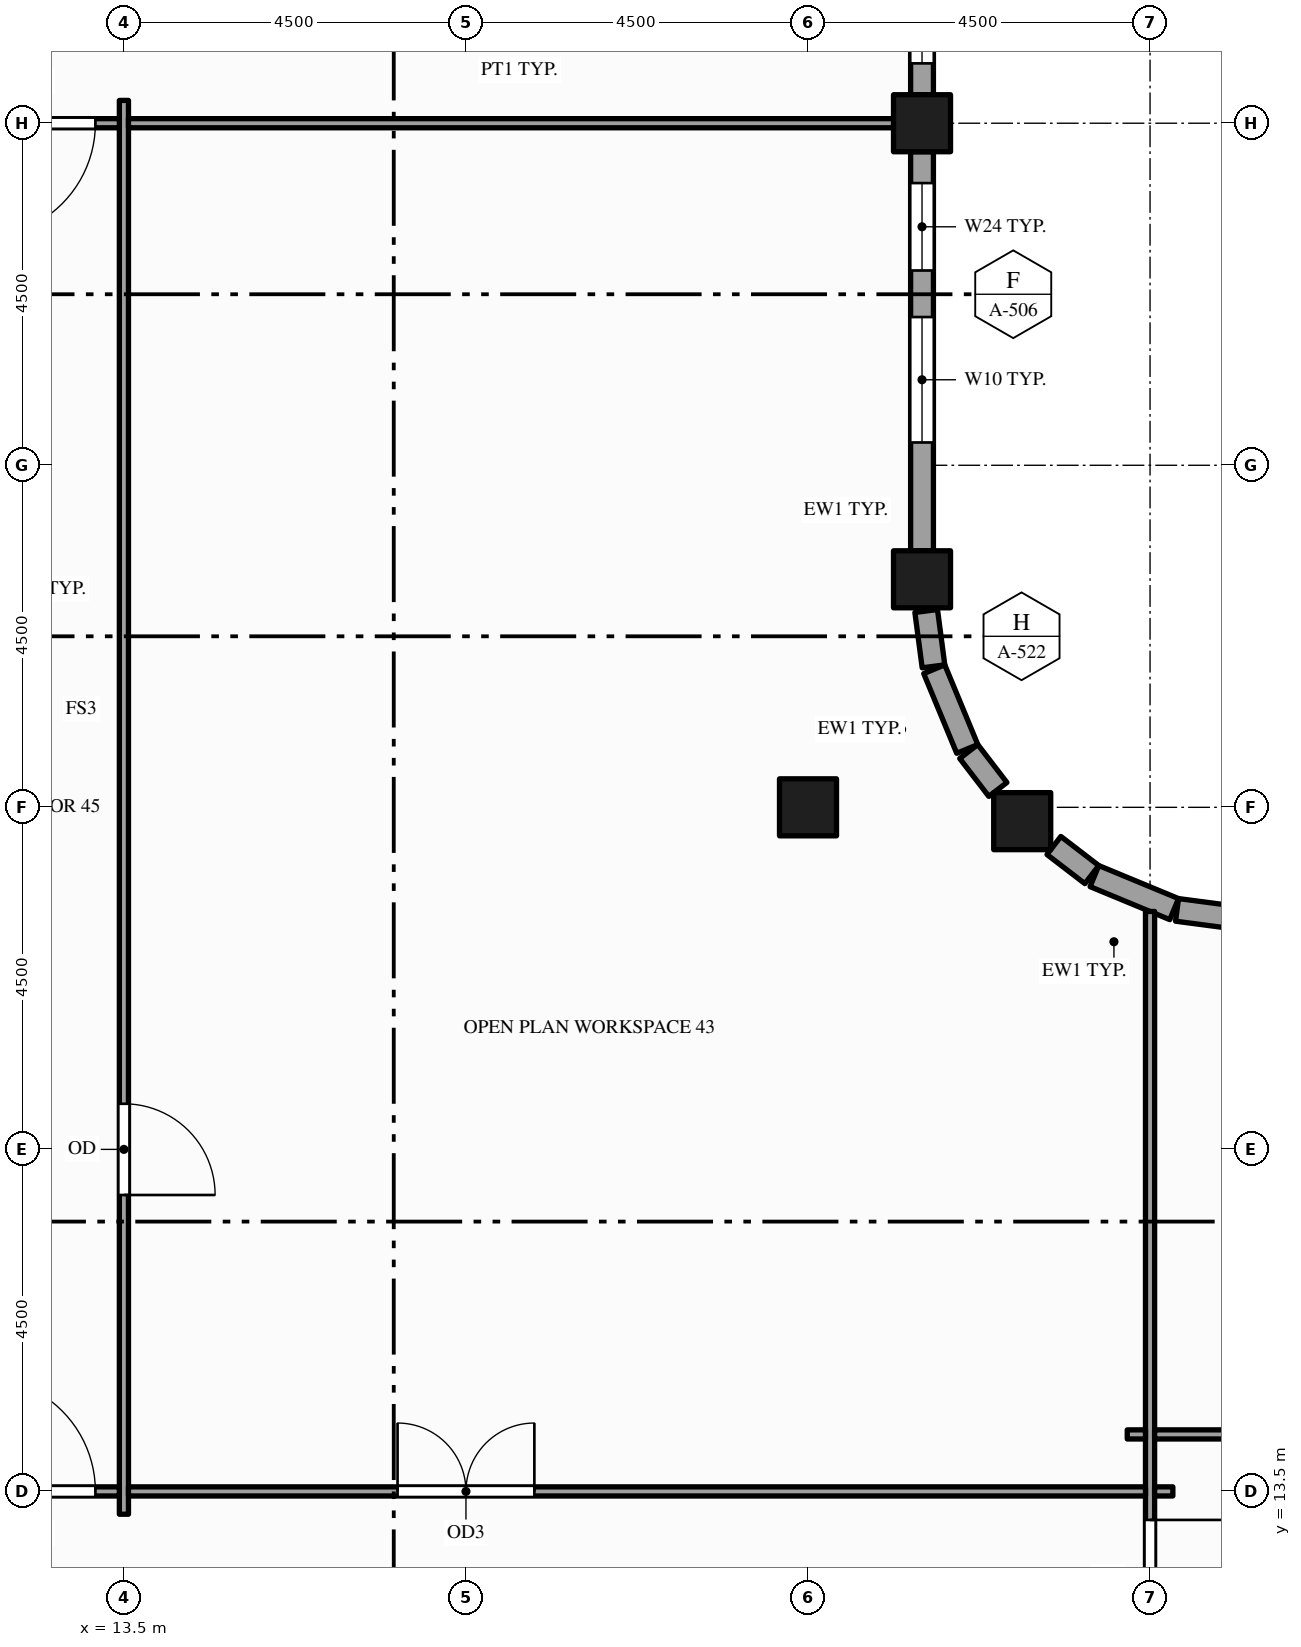
"""IFC4 building model, lengths in metres.
Left out: names, types, materials, properties, quantities, classifications, styles, units other than length and angle.
Written with IfcOpenShell. Run it as: python <this file> out.ifc"""

import sys

from ifc_helpers import new_model, si_unit, direction, frame, frame_2d, origin, origin_2d, place, context, subcontext, project, spatial, rectangle, hollow_rectangle, extrude, element, fill, save


model = new_model("IFC4")
c1 = context("Model", 3, precision=1e-05, world=origin(), true_north=direction((0.0, 1.0)))
c2 = subcontext(c1, "Body", "Model", "MODEL_VIEW")
j1 = project(units=[si_unit("LENGTHUNIT", "METRE"), si_unit("PLANEANGLEUNIT", "RADIAN")], contexts=[c1])
p1 = place(None, origin())
s1 = spatial("IfcSite", under=j1, at=p1, CompositionType="ELEMENT")
p2 = place(p1, origin())
s2 = spatial("IfcBuilding", under=s1, at=p2, CompositionType="ELEMENT")
p3 = place(p2, frame((0.0, 0.0, 207.0)))
s3 = spatial("IfcBuildingStorey", under=s2, at=p3, CompositionType="ELEMENT", Elevation=207.0)
for number, where, z_axis, x_axis in (
    (1, (22.5, 22.5, -0.15), (0.0, 0.0, 1.0), (1.0, 0.0, 0.0)),
    (2, (24.0, 25.5, -0.15), (0.0, 0.0, 1.0), (1.0, 0.0, 0.0)),
    (3, (24.0, 31.5, -0.15), (0.0, 0.0, 1.0), (1.0, 0.0, 0.0)),
    (4, (25.318, 22.318, -0.15), (0.0, 0.0, 1.0), (1.0, 0.0, 0.0)),
):
    element("IfcColumn", number, at=place(p3, frame(where, z_axis=z_axis, x_axis=x_axis)), inside=s3, PredefinedType="COLUMN", context=c2, shape_type="SweptSolid", body=[
        extrude(hollow_rectangle(XDim=0.75, YDim=0.75, WallThickness=0.036, at=origin_2d()), origin(), (0.0, 0.0, 1.0), 4.0),
    ])
p4 = place(p3, frame((28.083, 21.055, 0.0), z_axis=(0.0, 0.0, 1.0), x_axis=(-0.99142711513, 0.130660917588, 0.0)))
e5 = element("IfcWall", 5, at=p4, inside=s3, PredefinedType="STANDARD", context=c2, shape_type="SweptSolid", body=[
    extrude(rectangle(XDim=0.734, YDim=0.3, at=frame_2d((0.367, 0.0))), origin(), (0.0, 0.0, 1.0), 3.157),
])
p5 = place(p3, frame((27.317, 21.161, 0.0), z_axis=(0.0, 0.0, 1.0), x_axis=(-0.923914616768, 0.382598720491, 0.0)))
e6 = element("IfcWall", 6, at=p5, inside=s3, PredefinedType="STANDARD", context=c2, shape_type="SweptSolid", body=[
    extrude(rectangle(XDim=1.135, YDim=0.3, at=frame_2d((0.568, 0.0))), origin(), (0.0, 0.0, 1.0), 2.87),
])
p6 = place(p3, frame((26.234, 21.615, 0.0), z_axis=(0.0, 0.0, 1.0), x_axis=(-0.793575131083, 0.608472276547, 0.0)))
e7 = element("IfcWall", 7, at=p6, inside=s3, PredefinedType="STANDARD", context=c2, shape_type="SweptSolid", body=[
    extrude(rectangle(XDim=0.629, YDim=0.3, at=frame_2d((0.314, 0.0))), origin(), (0.0, 0.0, 1.0), 3.157),
])
p7 = place(p3, frame((24.998, 22.735, 0.0), z_axis=(0.0, 0.0, 1.0), x_axis=(-0.608472276547, 0.793575131083, 0.0)))
e8 = element("IfcWall", 8, at=p7, inside=s3, PredefinedType="STANDARD", context=c2, shape_type="SweptSolid", body=[
    extrude(rectangle(XDim=0.629, YDim=0.3, at=frame_2d((0.314, 0.0))), origin(), (0.0, 0.0, 1.0), 2.76),
])
p8 = place(p3, frame((24.595, 23.268, 0.0), z_axis=(0.0, 0.0, 1.0), x_axis=(-0.382598720491, 0.923914616768, 0.0)))
e9 = element("IfcWall", 9, at=p8, inside=s3, PredefinedType="STANDARD", context=c2, shape_type="SweptSolid", body=[
    extrude(rectangle(XDim=1.135, YDim=0.3, at=frame_2d((0.568, 0.0))), origin(), (0.0, 0.0, 1.0), 2.76),
])
p9 = place(p3, frame((24.151, 24.355, 0.0), z_axis=(0.0, 0.0, 1.0), x_axis=(-0.130660917588, 0.99142711513, 0.0)))
e10 = element("IfcWall", 10, at=p9, inside=s3, PredefinedType="STANDARD", context=c2, shape_type="SweptSolid", body=[
    extrude(rectangle(XDim=0.734, YDim=0.3, at=frame_2d((0.367, 0.0))), origin(), (0.0, 0.0, 1.0), 3.157),
])
p10 = place(p3, frame((24.0, 25.875, 0.0), z_axis=(0.0, 0.0, 1.0), x_axis=(0.0, 1.0, 0.0)))
e11 = element("IfcWall", 11, at=p10, inside=s3, PredefinedType="STANDARD", context=c2, shape_type="SweptSolid", body=[
    extrude(rectangle(XDim=5.25, YDim=0.3, at=frame_2d((2.625, 0.0))), origin(), (0.0, 0.0, 1.0), 3.157),
])
p11 = place(p10, frame((1.425, 0.0, 0.9)))
e12 = element("IfcOpeningElement", 12, at=p11, cuts=e11, PredefinedType="OPENING", context=c2, shape_type="SweptSolid", body=[
    extrude(rectangle(XDim=1.65, YDim=2.0, at=frame_2d((0.825, 1.0))), frame((0.0, 0.16, 0.0), z_axis=(0.0, -1.0, 0.0), x_axis=(1.0, 0.0, 0.0)), (0.0, 0.0, 1.0), 0.32),
])
p12 = place(p10, frame((3.688, 0.0, 0.9)))
e13 = element("IfcOpeningElement", 13, at=p12, cuts=e11, PredefinedType="OPENING", context=c2, shape_type="SweptSolid", body=[
    extrude(rectangle(XDim=1.15, YDim=2.0, at=frame_2d((0.575, 1.0))), frame((0.0, 0.16, 0.0), z_axis=(0.0, -1.0, 0.0), x_axis=(1.0, 0.0, 0.0)), (0.0, 0.0, 1.0), 0.32),
])
p13 = place(p3, frame((24.0, 31.875, 0.0), z_axis=(0.0, 0.0, 1.0), x_axis=(0.0, 1.0, 0.0)))
e14 = element("IfcWall", 14, at=p13, inside=s3, PredefinedType="STANDARD", context=c2, shape_type="SweptSolid", body=[
    extrude(rectangle(XDim=3.75, YDim=0.3, at=frame_2d((1.875, 0.0))), origin(), (0.0, 0.0, 1.0), 3.157),
])
p14 = place(p13, frame((0.413, 0.0, 0.9)))
e15 = element("IfcOpeningElement", 15, at=p14, cuts=e14, PredefinedType="OPENING", context=c2, shape_type="SweptSolid", body=[
    extrude(rectangle(XDim=1.15, YDim=2.0, at=frame_2d((0.575, 1.0))), frame((0.0, 0.16, 0.0), z_axis=(0.0, -1.0, 0.0), x_axis=(1.0, 0.0, 0.0)), (0.0, 0.0, 1.0), 0.32),
])
p15 = place(p13, frame((2.188, 0.0, 0.9)))
e16 = element("IfcOpeningElement", 16, at=p15, cuts=e14, PredefinedType="OPENING", context=c2, shape_type="SweptSolid", body=[
    extrude(rectangle(XDim=1.15, YDim=2.0, at=frame_2d((0.575, 1.0))), frame((0.0, 0.16, 0.0), z_axis=(0.0, -1.0, 0.0), x_axis=(1.0, 0.0, 0.0)), (0.0, 0.0, 1.0), 0.32),
])
p16 = place(p3, frame((13.5, 13.2, 0.0), z_axis=(0.0, 0.0, 1.0), x_axis=(0.0, 1.0, 0.0)))
e17 = element("IfcWall", 17, at=p16, inside=s3, PredefinedType="PARTITIONING", context=c2, shape_type="SweptSolid", body=[
    extrude(rectangle(XDim=18.6, YDim=0.12, at=frame_2d((9.3, 0.0))), origin(), (0.0, 0.0, 1.0), 2.6),
])
p17 = place(p16, frame((4.2, 0.0, 0.0)))
e18 = element("IfcOpeningElement", 18, at=p17, cuts=e17, PredefinedType="OPENING", context=c2, shape_type="SweptSolid", body=[
    extrude(rectangle(XDim=1.2, YDim=2.1, at=frame_2d((0.6, 1.05))), frame((0.0, 0.07, 0.0), z_axis=(0.0, -1.0, 0.0), x_axis=(1.0, 0.0, 0.0)), (0.0, 0.0, 1.0), 0.14),
])
p18 = place(p3, frame((27.0, -1.35, 0.0), z_axis=(0.0, 0.0, 1.0), x_axis=(0.0, 1.0, 0.0)))
e19 = element("IfcWall", 19, at=p18, inside=s3, PredefinedType="PARTITIONING", context=c2, shape_type="SweptSolid", body=[
    extrude(rectangle(XDim=22.48, YDim=0.12, at=frame_2d((11.24, 0.0))), origin(), (0.0, 0.0, 1.0), 2.87),
])
p19 = place(p18, frame((12.975, 0.0, 0.0)))
e20 = element("IfcOpeningElement", 20, at=p19, cuts=e19, PredefinedType="OPENING", context=c2, shape_type="SweptSolid", body=[
    extrude(rectangle(XDim=1.5, YDim=2.1, at=frame_2d((0.75, 1.05))), frame((0.0, 0.07, 0.0), z_axis=(0.0, -1.0, 0.0), x_axis=(1.0, 0.0, 0.0)), (0.0, 0.0, 1.0), 0.14),
])
p20 = place(p3, frame((11.31, 13.5, 0.0), z_axis=(0.0, 0.0, 1.0), x_axis=(1.0, 0.0, 0.0)))
e21 = element("IfcWall", 21, at=p20, inside=s3, PredefinedType="PARTITIONING", context=c2, shape_type="SweptSolid", body=[
    extrude(rectangle(XDim=2.13, YDim=0.12, at=frame_2d((1.065, 0.0))), origin(), (0.0, 0.0, 1.0), 2.87),
])
p21 = place(p20, frame((0.315, 0.0, 0.0)))
e22 = element("IfcOpeningElement", 22, at=p21, cuts=e21, PredefinedType="OPENING", context=c2, shape_type="SweptSolid", body=[
    extrude(rectangle(XDim=1.5, YDim=2.1, at=frame_2d((0.75, 1.05))), frame((0.0, 0.07, 0.0), z_axis=(0.0, -1.0, 0.0), x_axis=(1.0, 0.0, 0.0)), (0.0, 0.0, 1.0), 0.14),
])
p22 = place(p3, frame((13.56, 13.5, 0.0), z_axis=(0.0, 0.0, 1.0), x_axis=(1.0, 0.0, 0.0)))
e23 = element("IfcWall", 23, at=p22, inside=s3, PredefinedType="PARTITIONING", context=c2, shape_type="SweptSolid", body=[
    extrude(rectangle(XDim=13.38, YDim=0.12, at=frame_2d((6.69, 0.0))), origin(), (0.0, 0.0, 1.0), 2.76),
])
p23 = place(p22, frame((3.54, 0.0, 0.0)))
e24 = element("IfcOpeningElement", 24, at=p23, cuts=e23, PredefinedType="OPENING", context=c2, shape_type="SweptSolid", body=[
    extrude(rectangle(XDim=1.8, YDim=2.1, at=frame_2d((0.9, 1.05))), frame((0.0, 0.07, 0.0), z_axis=(0.0, -1.0, 0.0), x_axis=(1.0, 0.0, 0.0)), (0.0, 0.0, 1.0), 0.14),
])
for number, where, z_axis, x_axis in (
    (25, (27.06, 13.5, 0.0), (0.0, 0.0, 1.0), (1.0, 0.0, 0.0)),
    (26, (26.7, 14.25, 0.0), (0.0, 0.0, 1.0), (1.0, 0.0, 0.0)),
):
    element("IfcWall", number, at=place(p3, frame(where, z_axis=z_axis, x_axis=x_axis)), inside=s3, PredefinedType="PARTITIONING", context=c2, shape_type="SweptSolid", body=[
        extrude(rectangle(XDim=0.24, YDim=0.12, at=frame_2d((0.12, 0.0))), origin(), (0.0, 0.0, 1.0), 2.87),
    ])
p24 = place(p3, frame((27.06, 14.25, 0.0), z_axis=(0.0, 0.0, 1.0), x_axis=(1.0, 0.0, 0.0)))
e27 = element("IfcWall", 27, at=p24, inside=s3, PredefinedType="PARTITIONING", context=c2, shape_type="SweptSolid", body=[
    extrude(rectangle(XDim=2.13, YDim=0.12, at=frame_2d((1.065, 0.0))), origin(), (0.0, 0.0, 1.0), 2.87),
])
p25 = place(p3, frame((11.31, 31.5, 0.0), z_axis=(0.0, 0.0, 1.0), x_axis=(1.0, 0.0, 0.0)))
e28 = element("IfcWall", 28, at=p25, inside=s3, PredefinedType="PARTITIONING", context=c2, shape_type="SweptSolid", body=[
    extrude(rectangle(XDim=2.13, YDim=0.12, at=frame_2d((1.065, 0.0))), origin(), (0.0, 0.0, 1.0), 2.87),
])
p26 = place(p25, frame((0.315, 0.0, 0.0)))
e29 = element("IfcOpeningElement", 29, at=p26, cuts=e28, PredefinedType="OPENING", context=c2, shape_type="SweptSolid", body=[
    extrude(rectangle(XDim=1.5, YDim=2.1, at=frame_2d((0.75, 1.05))), frame((0.0, 0.07, 0.0), z_axis=(0.0, -1.0, 0.0), x_axis=(1.0, 0.0, 0.0)), (0.0, 0.0, 1.0), 0.14),
])
p27 = place(p3, frame((13.56, 31.5, 0.0), z_axis=(0.0, 0.0, 1.0), x_axis=(1.0, 0.0, 0.0)))
e30 = element("IfcWall", 30, at=p27, inside=s3, PredefinedType="PARTITIONING", context=c2, shape_type="SweptSolid", body=[
    extrude(rectangle(XDim=10.29, YDim=0.12, at=frame_2d((5.145, 0.0))), origin(), (0.0, 0.0, 1.0), 2.87),
])
p28 = place(p11, origin())
e31 = element("IfcWindow", 31, at=p28, inside=s3, PartitioningType="SINGLE_PANEL", PredefinedType="WINDOW", context=c2, shape_type="SweptSolid", body=[
    extrude(rectangle(XDim=1.65, YDim=2.0, at=frame_2d((0.825, 1.0))), frame((0.0, 0.03, 0.0), z_axis=(0.0, -1.0, 0.0), x_axis=(1.0, 0.0, 0.0)), (0.0, 0.0, 1.0), 0.06),
])
fill(e12, e31)
p29 = place(p12, origin())
e32 = element("IfcWindow", 32, at=p29, inside=s3, PartitioningType="SINGLE_PANEL", PredefinedType="WINDOW", context=c2, shape_type="SweptSolid", body=[
    extrude(rectangle(XDim=1.15, YDim=2.0, at=frame_2d((0.575, 1.0))), frame((0.0, 0.03, 0.0), z_axis=(0.0, -1.0, 0.0), x_axis=(1.0, 0.0, 0.0)), (0.0, 0.0, 1.0), 0.06),
])
fill(e13, e32)
p30 = place(p14, origin())
e33 = element("IfcWindow", 33, at=p30, inside=s3, PartitioningType="SINGLE_PANEL", PredefinedType="WINDOW", context=c2, shape_type="SweptSolid", body=[
    extrude(rectangle(XDim=1.15, YDim=2.0, at=frame_2d((0.575, 1.0))), frame((0.0, 0.03, 0.0), z_axis=(0.0, -1.0, 0.0), x_axis=(1.0, 0.0, 0.0)), (0.0, 0.0, 1.0), 0.06),
])
fill(e15, e33)
p31 = place(p19, origin())
e34 = element("IfcDoor", 34, at=p31, inside=s3, OperationType="SINGLE_SWING_RIGHT", PredefinedType="DOOR", context=c2, shape_type="SweptSolid", body=[
    extrude(rectangle(XDim=1.5, YDim=2.1, at=frame_2d((0.75, 1.05))), frame((0.0, 0.025, 0.0), z_axis=(0.0, -1.0, 0.0), x_axis=(1.0, 0.0, 0.0)), (0.0, 0.0, 1.0), 0.05),
])
fill(e20, e34)
p32 = place(p23, origin())
e35 = element("IfcDoor", 35, at=p32, inside=s3, OperationType="DOUBLE_DOOR_SINGLE_SWING", PredefinedType="DOOR", context=c2, shape_type="SweptSolid", body=[
    extrude(rectangle(XDim=1.8, YDim=2.1, at=frame_2d((0.9, 1.05))), frame((0.0, 0.025, 0.0), z_axis=(0.0, -1.0, 0.0), x_axis=(1.0, 0.0, 0.0)), (0.0, 0.0, 1.0), 0.05),
])
fill(e24, e35)
p33 = place(p21, origin())
e36 = element("IfcDoor", 36, at=p33, inside=s3, OperationType="SINGLE_SWING_LEFT", PredefinedType="DOOR", context=c2, shape_type="SweptSolid", body=[
    extrude(rectangle(XDim=1.5, YDim=2.1, at=frame_2d((0.75, 1.05))), frame((0.0, 0.025, 0.0), z_axis=(0.0, -1.0, 0.0), x_axis=(1.0, 0.0, 0.0)), (0.0, 0.0, 1.0), 0.05),
])
fill(e22, e36)
p34 = place(p26, origin())
e37 = element("IfcDoor", 37, at=p34, inside=s3, OperationType="SINGLE_SWING_LEFT", PredefinedType="DOOR", context=c2, shape_type="SweptSolid", body=[
    extrude(rectangle(XDim=1.5, YDim=2.1, at=frame_2d((0.75, 1.05))), frame((0.0, 0.025, 0.0), z_axis=(0.0, -1.0, 0.0), x_axis=(1.0, 0.0, 0.0)), (0.0, 0.0, 1.0), 0.05),
])
fill(e29, e37)
p35 = place(p17, origin())
e38 = element("IfcDoor", 38, at=p35, inside=s3, OperationType="SINGLE_SWING_LEFT", PredefinedType="DOOR", context=c2, shape_type="SweptSolid", body=[
    extrude(rectangle(XDim=1.2, YDim=2.1, at=frame_2d((0.6, 1.05))), frame((0.0, 0.025, 0.0), z_axis=(0.0, -1.0, 0.0), x_axis=(1.0, 0.0, 0.0)), (0.0, 0.0, 1.0), 0.05),
])
fill(e18, e38)
save(model, sys.argv[1])
